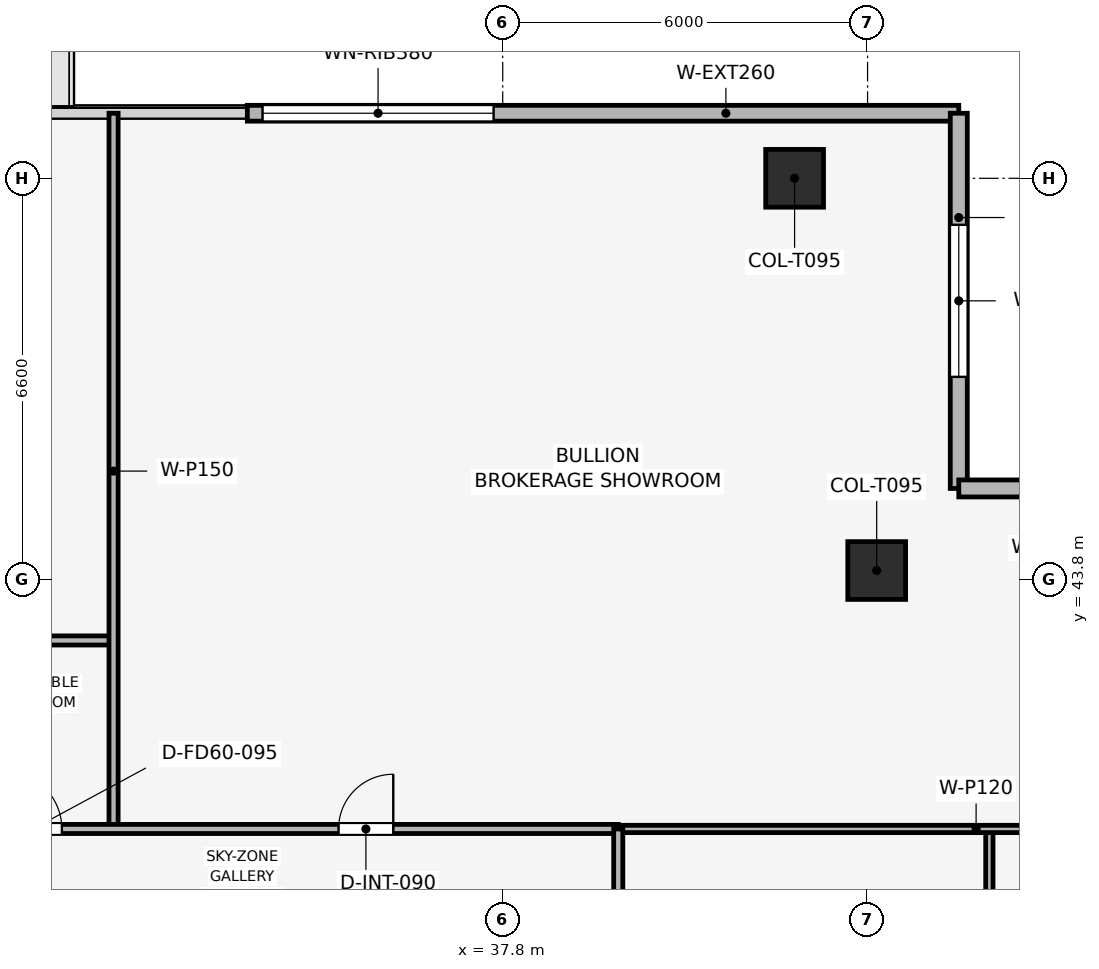
"""IFC4 building model, lengths in metres.
Left out: names, types, materials, properties, quantities, classifications, styles, units other than length and angle.
Written with IfcOpenShell. Run it as: python <this file> out.ifc"""

import sys

from ifc_helpers import new_model, si_unit, direction, frame, frame_2d, origin, origin_2d, place, context, subcontext, project, spatial, rectangle, extrude, element, fill, save


model = new_model("IFC4")
c1 = context("Model", 3, precision=1e-05, world=origin(), true_north=direction((0.0, 1.0)))
c2 = subcontext(c1, "Body", "Model", "MODEL_VIEW")
j1 = project(units=[si_unit("LENGTHUNIT", "METRE"), si_unit("PLANEANGLEUNIT", "RADIAN")], contexts=[c1])
p1 = place(None, origin())
s1 = spatial("IfcSite", under=j1, at=p1, CompositionType="ELEMENT")
p2 = place(p1, origin())
s2 = spatial("IfcBuilding", under=s1, at=p2, CompositionType="ELEMENT")
p3 = place(p2, frame((0.0, 0.0, 318.0)))
s3 = spatial("IfcBuildingStorey", under=s2, at=p3, CompositionType="ELEMENT", Elevation=318.0)
for number, where, z_axis, x_axis in (
    (1, (42.6, 50.4, 0.003), (0.0, 0.0, 1.0), (1.0, 0.0, 0.0)),
    (2, (43.95, 43.95, 0.003), (0.0, 0.0, 1.0), (1.0, 0.0, 0.0)),
):
    element("IfcColumn", number, at=place(p3, frame(where, z_axis=z_axis, x_axis=x_axis)), inside=s3, PredefinedType="COLUMN", context=c2, shape_type="SweptSolid", body=[
        extrude(rectangle(XDim=0.95, YDim=0.95, at=origin_2d()), origin(), (0.0, 0.0, 1.0), 3.504),
    ])
p4 = place(p3, frame((33.6, 51.47, 0.0), z_axis=(0.0, 0.0, 1.0), x_axis=(1.0, 0.0, 0.0)))
e3 = element("IfcWall", 3, at=p4, inside=s3, PredefinedType="SOLIDWALL", context=c2, shape_type="SweptSolid", body=[
    extrude(rectangle(XDim=11.7, YDim=0.26, at=frame_2d((5.85, 0.0))), origin(), (0.0, 0.0, 1.0), 3.51),
])
p5 = place(p4, frame((0.25, 0.0, 0.9)))
e4 = element("IfcOpeningElement", 4, at=p5, cuts=e3, PredefinedType="OPENING", context=c2, shape_type="SweptSolid", body=[
    extrude(rectangle(XDim=3.8, YDim=1.9, at=frame_2d((1.9, 0.95))), frame((0.0, 0.14, 0.0), z_axis=(0.0, -1.0, 0.0), x_axis=(1.0, 0.0, 0.0)), (0.0, 0.0, 1.0), 0.28),
])
p6 = place(p3, frame((45.3, 51.47, 0.0), z_axis=(0.0, 0.0, 1.0), x_axis=(0.0, -1.0, 0.0)))
e5 = element("IfcWall", 5, at=p6, inside=s3, PredefinedType="SOLIDWALL", context=c2, shape_type="SweptSolid", body=[
    extrude(rectangle(XDim=6.17, YDim=0.28, at=frame_2d((3.085, 0.0))), origin(), (0.0, 0.0, 1.0), 3.51),
])
p7 = place(p6, frame((1.835, 0.0, 0.9)))
e6 = element("IfcOpeningElement", 6, at=p7, cuts=e5, PredefinedType="OPENING", context=c2, shape_type="SweptSolid", body=[
    extrude(rectangle(XDim=2.5, YDim=1.9, at=frame_2d((1.25, 0.95))), frame((0.0, 0.15, 0.0), z_axis=(0.0, -1.0, 0.0), x_axis=(1.0, 0.0, 0.0)), (0.0, 0.0, 1.0), 0.3),
])
p8 = place(p3, frame((45.3, 45.3, 0.0), z_axis=(0.0, 0.0, 1.0), x_axis=(1.0, 0.0, 0.0)))
e7 = element("IfcWall", 7, at=p8, inside=s3, PredefinedType="SOLIDWALL", context=c2, shape_type="SweptSolid", body=[
    extrude(rectangle(XDim=6.17, YDim=0.28, at=frame_2d((3.085, 0.0))), origin(), (0.0, 0.0, 1.0), 3.51),
])
p9 = place(p8, frame((1.835, 0.0, 0.9)))
e8 = element("IfcOpeningElement", 8, at=p9, cuts=e7, PredefinedType="OPENING", context=c2, shape_type="SweptSolid", body=[
    extrude(rectangle(XDim=2.5, YDim=1.9, at=frame_2d((1.25, 0.95))), frame((0.0, 0.15, 0.0), z_axis=(0.0, -1.0, 0.0), x_axis=(1.0, 0.0, 0.0)), (0.0, 0.0, 1.0), 0.3),
])
p10 = place(p3, frame((23.0, 42.8, 0.0), z_axis=(0.0, 0.0, 1.0), x_axis=(1.0, 0.0, 0.0)))
e9 = element("IfcWall", 9, at=p10, inside=s3, PredefinedType="PARTITIONING", context=c2, shape_type="SweptSolid", body=[
    extrude(rectangle(XDim=8.4, YDim=0.15, at=frame_2d((4.2, 0.0))), origin(), (0.0, 0.0, 1.0), 3.095),
])
p11 = place(p3, frame((31.4, 39.7, 0.0), z_axis=(0.0, 0.0, 1.0), x_axis=(0.0, 1.0, 0.0)))
e10 = element("IfcWall", 10, at=p11, inside=s3, PredefinedType="PARTITIONING", context=c2, shape_type="SweptSolid", body=[
    extrude(rectangle(XDim=11.77, YDim=0.15, at=frame_2d((5.885, 0.0))), origin(), (0.0, 0.0, 1.0), 3.135),
])
p12 = place(p3, frame((45.803, 31.295, 0.0), z_axis=(0.0, 0.0, 1.0), x_axis=(0.0, 1.0, 0.0)))
e11 = element("IfcWall", 11, at=p12, inside=s3, PredefinedType="PARTITIONING", context=c2, shape_type="SweptSolid", body=[
    extrude(rectangle(XDim=8.405, YDim=0.12, at=frame_2d((4.203, 0.0))), origin(), (0.0, 0.0, 1.0), 3.095),
])
p13 = place(p12, frame((4.049, 0.0, 0.0)))
e12 = element("IfcOpeningElement", 12, at=p13, cuts=e11, PredefinedType="OPENING", context=c2, shape_type="SweptSolid", body=[
    extrude(rectangle(XDim=0.9, YDim=2.1, at=frame_2d((0.45, 1.05))), frame((0.0, 0.07, 0.0), z_axis=(0.0, -1.0, 0.0), x_axis=(1.0, 0.0, 0.0)), (0.0, 0.0, 1.0), 0.14),
])
p14 = place(p3, frame((39.7, 39.7, 0.0), z_axis=(0.0, 0.0, 1.0), x_axis=(1.0, 0.0, 0.0)))
e13 = element("IfcWall", 13, at=p14, inside=s3, PredefinedType="PARTITIONING", context=c2, shape_type="SweptSolid", body=[
    extrude(rectangle(XDim=11.77, YDim=0.12, at=frame_2d((5.885, 0.0))), origin(), (0.0, 0.0, 1.0), 3.095),
])
p15 = place(p3, frame((17.9, 39.7, 0.0), z_axis=(0.0, 0.0, 1.0), x_axis=(1.0, 0.0, 0.0)))
e14 = element("IfcWall", 14, at=p15, inside=s3, PredefinedType="PARTITIONING", context=c2, shape_type="SweptSolid", body=[
    extrude(rectangle(XDim=21.8, YDim=0.15, at=frame_2d((10.9, 0.0))), origin(), (0.0, 0.0, 1.0), 3.095),
])
p16 = place(p15, frame((2.1, 0.0, 0.0)))
e15 = element("IfcOpeningElement", 15, at=p16, cuts=e14, PredefinedType="OPENING", context=c2, shape_type="SweptSolid", body=[
    extrude(rectangle(XDim=0.9, YDim=2.1, at=frame_2d((0.45, 1.05))), frame((0.0, 0.085, 0.0), z_axis=(0.0, -1.0, 0.0), x_axis=(1.0, 0.0, 0.0)), (0.0, 0.0, 1.0), 0.17),
])
p17 = place(p15, frame((6.05, 0.0, 0.0)))
e16 = element("IfcOpeningElement", 16, at=p17, cuts=e14, PredefinedType="OPENING", context=c2, shape_type="SweptSolid", body=[
    extrude(rectangle(XDim=0.9, YDim=2.1, at=frame_2d((0.45, 1.05))), frame((0.0, 0.085, 0.0), z_axis=(0.0, -1.0, 0.0), x_axis=(1.0, 0.0, 0.0)), (0.0, 0.0, 1.0), 0.17),
])
p18 = place(p15, frame((8.95, 0.0, 0.0)))
e17 = element("IfcOpeningElement", 17, at=p18, cuts=e14, PredefinedType="OPENING", context=c2, shape_type="SweptSolid", body=[
    extrude(rectangle(XDim=0.9, YDim=2.1, at=frame_2d((0.45, 1.05))), frame((0.0, 0.085, 0.0), z_axis=(0.0, -1.0, 0.0), x_axis=(1.0, 0.0, 0.0)), (0.0, 0.0, 1.0), 0.17),
])
p19 = place(p15, frame((11.7, 0.0, 0.0)))
e18 = element("IfcOpeningElement", 18, at=p19, cuts=e14, PredefinedType="OPENING", context=c2, shape_type="SweptSolid", body=[
    extrude(rectangle(XDim=0.95, YDim=2.1, at=frame_2d((0.475, 1.05))), frame((0.0, 0.085, 0.0), z_axis=(0.0, -1.0, 0.0), x_axis=(1.0, 0.0, 0.0)), (0.0, 0.0, 1.0), 0.17),
])
p20 = place(p15, frame((17.2, 0.0, 0.0)))
e19 = element("IfcOpeningElement", 19, at=p20, cuts=e14, PredefinedType="OPENING", context=c2, shape_type="SweptSolid", body=[
    extrude(rectangle(XDim=0.9, YDim=2.1, at=frame_2d((0.45, 1.05))), frame((0.0, 0.085, 0.0), z_axis=(0.0, -1.0, 0.0), x_axis=(1.0, 0.0, 0.0)), (0.0, 0.0, 1.0), 0.17),
])
p21 = place(p3, frame((39.7, 24.4, 0.0), z_axis=(0.0, 0.0, 1.0), x_axis=(0.0, 1.0, 0.0)))
e20 = element("IfcWall", 20, at=p21, inside=s3, PredefinedType="PARTITIONING", context=c2, shape_type="SweptSolid", body=[
    extrude(rectangle(XDim=15.3, YDim=0.15, at=frame_2d((7.65, 0.0))), origin(), (0.0, 0.0, 1.0), 3.095),
])
p22 = place(p21, frame((0.7, 0.0, 0.0)))
e21 = element("IfcOpeningElement", 21, at=p22, cuts=e20, PredefinedType="OPENING", context=c2, shape_type="SweptSolid", body=[
    extrude(rectangle(XDim=0.9, YDim=2.1, at=frame_2d((0.45, 1.05))), frame((0.0, 0.085, 0.0), z_axis=(0.0, -1.0, 0.0), x_axis=(1.0, 0.0, 0.0)), (0.0, 0.0, 1.0), 0.17),
])
p23 = place(p21, frame((4.148, 0.0, 0.0)))
e22 = element("IfcOpeningElement", 22, at=p23, cuts=e20, PredefinedType="OPENING", context=c2, shape_type="SweptSolid", body=[
    extrude(rectangle(XDim=0.9, YDim=2.1, at=frame_2d((0.45, 1.05))), frame((0.0, 0.085, 0.0), z_axis=(0.0, -1.0, 0.0), x_axis=(1.0, 0.0, 0.0)), (0.0, 0.0, 1.0), 0.17),
])
p24 = place(p21, frame((10.648, 0.0, 0.0)))
e23 = element("IfcOpeningElement", 23, at=p24, cuts=e20, PredefinedType="OPENING", context=c2, shape_type="SweptSolid", body=[
    extrude(rectangle(XDim=0.9, YDim=2.1, at=frame_2d((0.45, 1.05))), frame((0.0, 0.085, 0.0), z_axis=(0.0, -1.0, 0.0), x_axis=(1.0, 0.0, 0.0)), (0.0, 0.0, 1.0), 0.17),
])
p25 = place(p5, origin())
e24 = element("IfcWindow", 24, at=p25, inside=s3, PartitioningType="SINGLE_PANEL", PredefinedType="WINDOW", context=c2, shape_type="SweptSolid", body=[
    extrude(rectangle(XDim=3.8, YDim=1.9, at=frame_2d((1.9, 0.95))), frame((0.0, 0.03, 0.0), z_axis=(0.0, -1.0, 0.0), x_axis=(1.0, 0.0, 0.0)), (0.0, 0.0, 1.0), 0.06),
])
fill(e4, e24)
p26 = place(p7, origin())
e25 = element("IfcWindow", 25, at=p26, inside=s3, PartitioningType="SINGLE_PANEL", PredefinedType="WINDOW", context=c2, shape_type="SweptSolid", body=[
    extrude(rectangle(XDim=2.5, YDim=1.9, at=frame_2d((1.25, 0.95))), frame((0.0, 0.03, 0.0), z_axis=(0.0, -1.0, 0.0), x_axis=(1.0, 0.0, 0.0)), (0.0, 0.0, 1.0), 0.06),
])
fill(e6, e25)
p27 = place(p19, origin())
e26 = element("IfcDoor", 26, at=p27, inside=s3, OperationType="SINGLE_SWING_LEFT", PredefinedType="DOOR", context=c2, shape_type="SweptSolid", body=[
    extrude(rectangle(XDim=0.95, YDim=2.1, at=frame_2d((0.475, 1.05))), frame((0.0, 0.025, 0.0), z_axis=(0.0, -1.0, 0.0), x_axis=(1.0, 0.0, 0.0)), (0.0, 0.0, 1.0), 0.05),
])
fill(e18, e26)
p28 = place(p20, origin())
e27 = element("IfcDoor", 27, at=p28, inside=s3, OperationType="SINGLE_SWING_RIGHT", PredefinedType="DOOR", context=c2, shape_type="SweptSolid", body=[
    extrude(rectangle(XDim=0.9, YDim=2.1, at=frame_2d((0.45, 1.05))), frame((0.0, 0.025, 0.0), z_axis=(0.0, -1.0, 0.0), x_axis=(1.0, 0.0, 0.0)), (0.0, 0.0, 1.0), 0.05),
])
fill(e19, e27)
save(model, sys.argv[1])
